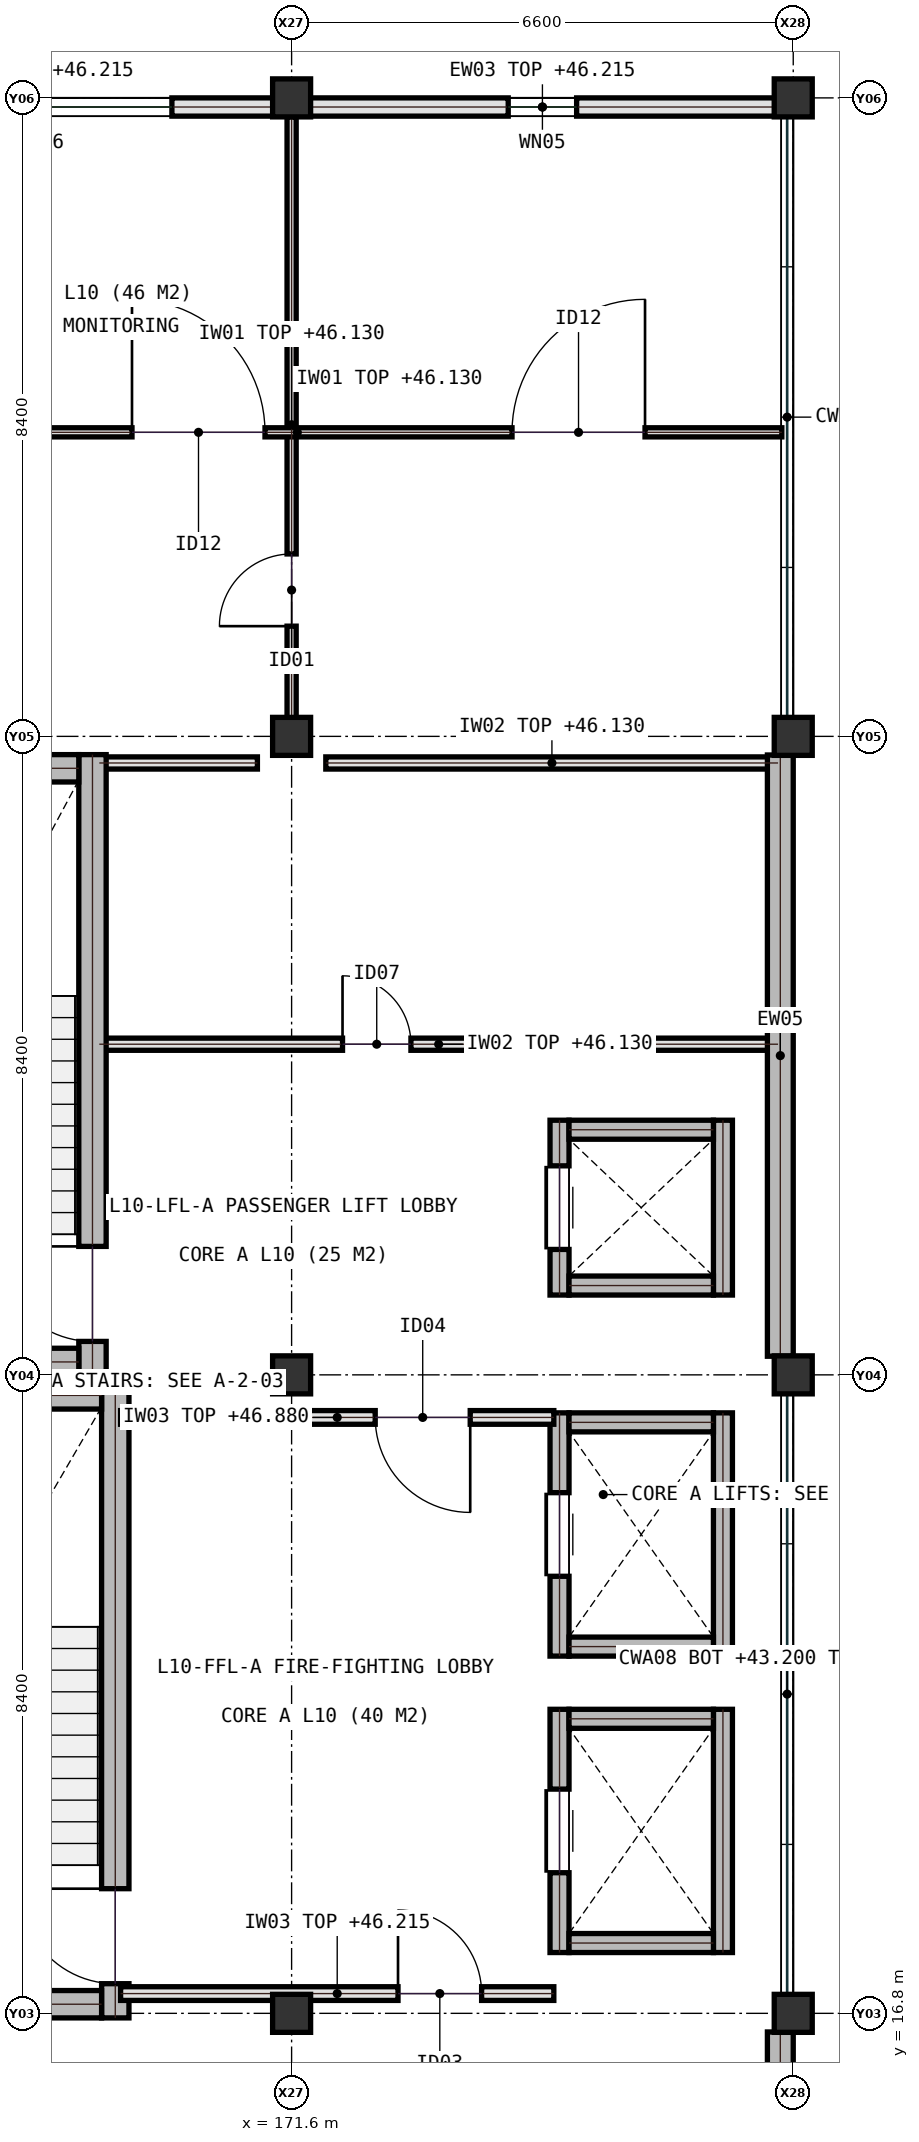
"""IFC4 building model, lengths in metres.
Left out: names, types, materials, properties, quantities, classifications, styles, units other than length and angle.
Written with IfcOpenShell. Run it as: python <this file> out.ifc"""

import sys

from ifc_helpers import new_model, si_unit, direction, frame, frame_2d, origin, origin_2d, place, context, subcontext, project, spatial, rectangle, extrude, element, fill, save


model = new_model("IFC4")
c1 = context("Model", 3, precision=1e-05, world=origin(), true_north=direction((0.0, 1.0)))
c2 = subcontext(c1, "Body", "Model", "MODEL_VIEW")
j1 = project(units=[si_unit("LENGTHUNIT", "METRE"), si_unit("PLANEANGLEUNIT", "RADIAN")], contexts=[c1])
p1 = place(None, origin())
s1 = spatial("IfcSite", under=j1, at=p1, CompositionType="ELEMENT")
p2 = place(p1, origin())
s2 = spatial("IfcBuilding", under=s1, at=p2, CompositionType="ELEMENT")
p3 = place(p2, frame((0.0, 0.0, 43.2)))
s3 = spatial("IfcBuildingStorey", under=s2, at=p3, CompositionType="ELEMENT", Elevation=43.2)
for number, where, z_axis, x_axis in (
    (1, (171.6, 16.8, 0.0), (0.0, 0.0, 1.0), (1.0, 0.0, 0.0)),
    (2, (171.6, 25.2, 0.0), (0.0, 0.0, 1.0), (1.0, 0.0, 0.0)),
    (3, (171.6, 33.6, 0.0), (0.0, 0.0, 1.0), (1.0, 0.0, 0.0)),
    (4, (171.6, 42.0, 0.0), (0.0, 0.0, 1.0), (1.0, 0.0, 0.0)),
    (5, (178.2, 16.8, 0.0), (0.0, 0.0, 1.0), (1.0, 0.0, 0.0)),
    (6, (178.2, 25.2, 0.0), (0.0, 0.0, 1.0), (1.0, 0.0, 0.0)),
    (7, (178.2, 33.6, 0.0), (0.0, 0.0, 1.0), (1.0, 0.0, 0.0)),
    (8, (178.2, 42.0, 0.0), (0.0, 0.0, 1.0), (1.0, 0.0, 0.0)),
):
    element("IfcColumn", number, at=place(p3, frame(where, z_axis=z_axis, x_axis=x_axis)), inside=s3, PredefinedType="COLUMN", context=c2, shape_type="SweptSolid", body=[
        extrude(rectangle(XDim=0.5, YDim=0.5, at=origin_2d()), origin(), (0.0, 0.0, 1.0), 3.9),
    ])
p4 = place(p3, frame((171.6, 33.65, 0.0), z_axis=(0.0, 0.0, 1.0), x_axis=(0.0, 1.0, 0.0)))
e9 = element("IfcWall", 9, at=p4, inside=s3, PredefinedType="PARTITIONING", context=c2, shape_type="SweptSolid", body=[
    extrude(rectangle(XDim=8.1, YDim=0.12, at=frame_2d((4.05, 0.0))), origin(), (0.0, 0.0, 1.0), 2.93),
])
p5 = place(p4, frame((1.4, 0.0, 0.0)))
e10 = element("IfcOpeningElement", 10, at=p5, cuts=e9, PredefinedType="OPENING", context=c2, shape_type="SweptSolid", body=[
    extrude(rectangle(XDim=0.95, YDim=2.15, at=frame_2d((0.475, 1.075))), frame((0.0, 0.07, 0.0), z_axis=(0.0, -1.0, 0.0), x_axis=(1.0, 0.0, 0.0)), (0.0, 0.0, 1.0), 0.14),
])
p6 = place(p3, frame((165.3, 37.6, 0.0), z_axis=(0.0, 0.0, 1.0), x_axis=(1.0, 0.0, 0.0)))
e11 = element("IfcWall", 11, at=p6, inside=s3, PredefinedType="PARTITIONING", context=c2, shape_type="SweptSolid", body=[
    extrude(rectangle(XDim=12.75, YDim=0.12, at=frame_2d((6.375, 0.0))), origin(), (0.0, 0.0, 1.0), 2.93),
])
p7 = place(p6, frame((4.2, 0.0, 0.0)))
e12 = element("IfcOpeningElement", 12, at=p7, cuts=e11, PredefinedType="OPENING", context=c2, shape_type="SweptSolid", body=[
    extrude(rectangle(XDim=1.75, YDim=2.3, at=frame_2d((0.875, 1.15))), frame((0.0, 0.07, 0.0), z_axis=(0.0, -1.0, 0.0), x_axis=(1.0, 0.0, 0.0)), (0.0, 0.0, 1.0), 0.14),
])
p8 = place(p6, frame((9.2, 0.0, 0.0)))
e13 = element("IfcOpeningElement", 13, at=p8, cuts=e11, PredefinedType="OPENING", context=c2, shape_type="SweptSolid", body=[
    extrude(rectangle(XDim=1.75, YDim=2.3, at=frame_2d((0.875, 1.15))), frame((0.0, 0.07, 0.0), z_axis=(0.0, -1.0, 0.0), x_axis=(1.0, 0.0, 0.0)), (0.0, 0.0, 1.0), 0.14),
])
p9 = place(p3, frame((169.07, 29.55, 0.0), z_axis=(0.0, 0.0, 1.0), x_axis=(1.0, 0.0, 0.0)))
e14 = element("IfcWall", 14, at=p9, inside=s3, PredefinedType="PARTITIONING", context=c2, shape_type="SweptSolid", body=[
    extrude(rectangle(XDim=8.93, YDim=0.16, at=frame_2d((4.465, 0.0))), origin(), (0.0, 0.0, 1.0), 2.93),
])
p10 = place(p9, frame((3.2, 0.0, 0.0)))
e15 = element("IfcOpeningElement", 15, at=p10, cuts=e14, PredefinedType="OPENING", context=c2, shape_type="SweptSolid", body=[
    extrude(rectangle(XDim=0.9, YDim=2.1, at=frame_2d((0.45, 1.05))), frame((0.0, 0.09, 0.0), z_axis=(0.0, -1.0, 0.0), x_axis=(1.0, 0.0, 0.0)), (0.0, 0.0, 1.0), 0.18),
])
p11 = place(p3, frame((169.07, 33.25, 0.0), z_axis=(0.0, 0.0, 1.0), x_axis=(1.0, 0.0, 0.0)))
e16 = element("IfcWall", 16, at=p11, inside=s3, PredefinedType="PARTITIONING", context=c2, shape_type="SweptSolid", body=[
    extrude(rectangle(XDim=2.08, YDim=0.16, at=frame_2d((1.04, 0.0))), origin(), (0.0, 0.0, 1.0), 2.93),
])
p12 = place(p3, frame((172.05, 33.25, 0.0), z_axis=(0.0, 0.0, 1.0), x_axis=(1.0, 0.0, 0.0)))
e17 = element("IfcWall", 17, at=p12, inside=s3, PredefinedType="PARTITIONING", context=c2, shape_type="SweptSolid", body=[
    extrude(rectangle(XDim=5.95, YDim=0.16, at=frame_2d((2.975, 0.0))), origin(), (0.0, 0.0, 1.0), 2.93),
])
p13 = place(p3, frame((171.355, 41.88, 0.0), z_axis=(0.0, 0.0, 1.0), x_axis=(-1.0, 0.0, 0.0)))
e18 = element("IfcWall", 18, at=p13, inside=s3, PredefinedType="SOLIDWALL", context=c2, shape_type="SweptSolid", body=[
    extrude(rectangle(XDim=6.11, YDim=0.24, at=frame_2d((3.055, 0.0))), origin(), (0.0, 0.0, 1.0), 3.015),
])
p14 = place(p13, frame((1.33, 0.0, 0.95)))
e19 = element("IfcOpeningElement", 19, at=p14, cuts=e18, PredefinedType="OPENING", context=c2, shape_type="SweptSolid", body=[
    extrude(rectangle(XDim=3.45, YDim=1.7, at=frame_2d((1.725, 0.85))), frame((0.0, 0.13, 0.0), z_axis=(0.0, -1.0, 0.0), x_axis=(1.0, 0.0, 0.0)), (0.0, 0.0, 1.0), 0.26),
])
for number, where, z_axis, x_axis in (
    (20, (178.03, 8.645, 0.0), (0.0, 0.0, 1.0), (0.0, 1.0, 0.0)),
    (21, (178.03, 25.445, 0.0), (0.0, 0.0, 1.0), (0.0, 1.0, 0.0)),
):
    element("IfcWall", number, at=place(p3, frame(where, z_axis=z_axis, x_axis=x_axis)), inside=s3, PredefinedType="SHEAR", context=c2, shape_type="SweptSolid", body=[
        extrude(rectangle(XDim=7.91, YDim=0.34, at=frame_2d((3.955, 0.0))), origin(), (0.0, 0.0, 1.0), 3.68),
    ])
p15 = place(p3, frame((177.955, 41.88, 0.0), z_axis=(0.0, 0.0, 1.0), x_axis=(-1.0, 0.0, 0.0)))
e22 = element("IfcWall", 22, at=p15, inside=s3, PredefinedType="SOLIDWALL", context=c2, shape_type="SweptSolid", body=[
    extrude(rectangle(XDim=6.11, YDim=0.24, at=frame_2d((3.055, 0.0))), origin(), (0.0, 0.0, 1.0), 3.015),
])
p16 = place(p15, frame((2.605, 0.0, 0.95)))
e23 = element("IfcOpeningElement", 23, at=p16, cuts=e22, PredefinedType="OPENING", context=c2, shape_type="SweptSolid", body=[
    extrude(rectangle(XDim=0.9, YDim=1.4, at=frame_2d((0.45, 0.7))), frame((0.0, 0.13, 0.0), z_axis=(0.0, -1.0, 0.0), x_axis=(1.0, 0.0, 0.0)), (0.0, 0.0, 1.0), 0.26),
])
p17 = place(p3, frame((169.28, 16.74, 0.0), z_axis=(0.0, 0.0, 1.0), x_axis=(0.0, 1.0, 0.0)))
e24 = element("IfcWall", 24, at=p17, inside=s3, PredefinedType="SHEAR", context=c2, shape_type="SweptSolid", body=[
    extrude(rectangle(XDim=8.37, YDim=0.36, at=frame_2d((4.185, 0.0))), origin(), (0.0, 0.0, 1.0), 3.68),
])
p18 = place(p17, frame((0.45, 0.0, 0.0)))
e25 = element("IfcOpeningElement", 25, at=p18, cuts=e24, PredefinedType="OPENING", context=c2, shape_type="SweptSolid", body=[
    extrude(rectangle(XDim=1.25, YDim=2.15, at=frame_2d((0.625, 1.075))), frame((0.0, 0.19, 0.0), z_axis=(0.0, -1.0, 0.0), x_axis=(1.0, 0.0, 0.0)), (0.0, 0.0, 1.0), 0.38),
])
for number, where, z_axis, x_axis in (
    (26, (165.6, 24.93, 0.0), (0.0, 0.0, 1.0), (1.0, 0.0, 0.0)),
    (27, (165.6, 16.92, 0.0), (0.0, 0.0, 1.0), (1.0, 0.0, 0.0)),
):
    element("IfcWall", number, at=place(p3, frame(where, z_axis=z_axis, x_axis=x_axis)), inside=s3, PredefinedType="SHEAR", context=c2, shape_type="SweptSolid", body=[
        extrude(rectangle(XDim=3.5, YDim=0.36, at=frame_2d((1.75, 0.0))), origin(), (0.0, 0.0, 1.0), 3.68),
    ])
p19 = place(p3, frame((168.98, 25.19, 0.0), z_axis=(0.0, 0.0, 1.0), x_axis=(0.0, 1.0, 0.0)))
e28 = element("IfcWall", 28, at=p19, inside=s3, PredefinedType="SHEAR", context=c2, shape_type="SweptSolid", body=[
    extrude(rectangle(XDim=8.17, YDim=0.36, at=frame_2d((4.085, 0.0))), origin(), (0.0, 0.0, 1.0), 3.68),
])
p20 = place(p19, frame((0.45, 0.0, 0.0)))
e29 = element("IfcOpeningElement", 29, at=p20, cuts=e28, PredefinedType="OPENING", context=c2, shape_type="SweptSolid", body=[
    extrude(rectangle(XDim=1.25, YDim=2.15, at=frame_2d((0.625, 1.075))), frame((0.0, 0.19, 0.0), z_axis=(0.0, -1.0, 0.0), x_axis=(1.0, 0.0, 0.0)), (0.0, 0.0, 1.0), 0.38),
])
for number, where, z_axis, x_axis in (
    (30, (165.6, 33.18, 0.0), (0.0, 0.0, 1.0), (1.0, 0.0, 0.0)),
    (31, (165.6, 25.37, 0.0), (0.0, 0.0, 1.0), (1.0, 0.0, 0.0)),
):
    element("IfcWall", number, at=place(p3, frame(where, z_axis=z_axis, x_axis=x_axis)), inside=s3, PredefinedType="SHEAR", context=c2, shape_type="SweptSolid", body=[
        extrude(rectangle(XDim=3.2, YDim=0.36, at=frame_2d((1.6, 0.0))), origin(), (0.0, 0.0, 1.0), 3.68),
    ])
p21 = place(p3, frame((175.125, 17.6, 0.0), z_axis=(0.0, 0.0, 1.0), x_axis=(0.0, 1.0, 0.0)))
e32 = element("IfcWall", 32, at=p21, inside=s3, PredefinedType="SHEAR", context=c2, shape_type="SweptSolid", body=[
    extrude(rectangle(XDim=3.2, YDim=0.25, at=frame_2d((1.6, 0.0))), origin(), (0.0, 0.0, 1.0), 3.68),
])
p22 = place(p21, frame((1.05, 0.0, 0.0)))
e33 = element("IfcOpeningElement", 33, at=p22, cuts=e32, PredefinedType="OPENING", context=c2, shape_type="SweptSolid", body=[
    extrude(rectangle(XDim=1.1, YDim=2.15, at=frame_2d((0.55, 1.075))), frame((0.0, 0.135, 0.0), z_axis=(0.0, -1.0, 0.0), x_axis=(1.0, 0.0, 0.0)), (0.0, 0.0, 1.0), 0.27),
])
p23 = place(p3, frame((177.275, 17.6, 0.0), z_axis=(0.0, 0.0, 1.0), x_axis=(0.0, 1.0, 0.0)))
e34 = element("IfcWall", 34, at=p23, inside=s3, PredefinedType="SHEAR", context=c2, shape_type="SweptSolid", body=[
    extrude(rectangle(XDim=3.2, YDim=0.25, at=frame_2d((1.6, 0.0))), origin(), (0.0, 0.0, 1.0), 3.68),
])
for number, where, z_axis, x_axis in (
    (35, (175.25, 17.725, 0.0), (0.0, 0.0, 1.0), (1.0, 0.0, 0.0)),
    (36, (175.25, 20.675, 0.0), (0.0, 0.0, 1.0), (1.0, 0.0, 0.0)),
):
    element("IfcWall", number, at=place(p3, frame(where, z_axis=z_axis, x_axis=x_axis)), inside=s3, PredefinedType="SHEAR", context=c2, shape_type="SweptSolid", body=[
        extrude(rectangle(XDim=1.9, YDim=0.25, at=frame_2d((0.95, 0.0))), origin(), (0.0, 0.0, 1.0), 3.68),
    ])
p24 = place(p3, frame((175.125, 21.5, 0.0), z_axis=(0.0, 0.0, 1.0), x_axis=(0.0, 1.0, 0.0)))
e37 = element("IfcWall", 37, at=p24, inside=s3, PredefinedType="SHEAR", context=c2, shape_type="SweptSolid", body=[
    extrude(rectangle(XDim=3.2, YDim=0.25, at=frame_2d((1.6, 0.0))), origin(), (0.0, 0.0, 1.0), 3.68),
])
p25 = place(p24, frame((1.05, 0.0, 0.0)))
e38 = element("IfcOpeningElement", 38, at=p25, cuts=e37, PredefinedType="OPENING", context=c2, shape_type="SweptSolid", body=[
    extrude(rectangle(XDim=1.1, YDim=2.15, at=frame_2d((0.55, 1.075))), frame((0.0, 0.135, 0.0), z_axis=(0.0, -1.0, 0.0), x_axis=(1.0, 0.0, 0.0)), (0.0, 0.0, 1.0), 0.27),
])
p26 = place(p3, frame((177.275, 21.5, 0.0), z_axis=(0.0, 0.0, 1.0), x_axis=(0.0, 1.0, 0.0)))
e39 = element("IfcWall", 39, at=p26, inside=s3, PredefinedType="SHEAR", context=c2, shape_type="SweptSolid", body=[
    extrude(rectangle(XDim=3.2, YDim=0.25, at=frame_2d((1.6, 0.0))), origin(), (0.0, 0.0, 1.0), 3.68),
])
for number, where, z_axis, x_axis in (
    (40, (175.25, 21.625, 0.0), (0.0, 0.0, 1.0), (1.0, 0.0, 0.0)),
    (41, (175.25, 24.575, 0.0), (0.0, 0.0, 1.0), (1.0, 0.0, 0.0)),
):
    element("IfcWall", number, at=place(p3, frame(where, z_axis=z_axis, x_axis=x_axis)), inside=s3, PredefinedType="SHEAR", context=c2, shape_type="SweptSolid", body=[
        extrude(rectangle(XDim=1.9, YDim=0.25, at=frame_2d((0.95, 0.0))), origin(), (0.0, 0.0, 1.0), 3.68),
    ])
p27 = place(p3, frame((175.125, 26.25, 0.0), z_axis=(0.0, 0.0, 1.0), x_axis=(0.0, 1.0, 0.0)))
e42 = element("IfcWall", 42, at=p27, inside=s3, PredefinedType="SHEAR", context=c2, shape_type="SweptSolid", body=[
    extrude(rectangle(XDim=2.3, YDim=0.25, at=frame_2d((1.15, 0.0))), origin(), (0.0, 0.0, 1.0), 3.68),
])
p28 = place(p27, frame((0.6, 0.0, 0.0)))
e43 = element("IfcOpeningElement", 43, at=p28, cuts=e42, PredefinedType="OPENING", context=c2, shape_type="SweptSolid", body=[
    extrude(rectangle(XDim=1.1, YDim=2.15, at=frame_2d((0.55, 1.075))), frame((0.0, 0.135, 0.0), z_axis=(0.0, -1.0, 0.0), x_axis=(1.0, 0.0, 0.0)), (0.0, 0.0, 1.0), 0.27),
])
p29 = place(p3, frame((177.275, 26.25, 0.0), z_axis=(0.0, 0.0, 1.0), x_axis=(0.0, 1.0, 0.0)))
e44 = element("IfcWall", 44, at=p29, inside=s3, PredefinedType="SHEAR", context=c2, shape_type="SweptSolid", body=[
    extrude(rectangle(XDim=2.3, YDim=0.25, at=frame_2d((1.15, 0.0))), origin(), (0.0, 0.0, 1.0), 3.68),
])
for number, where, z_axis, x_axis in (
    (45, (175.25, 26.375, 0.0), (0.0, 0.0, 1.0), (1.0, 0.0, 0.0)),
    (46, (175.25, 28.425, 0.0), (0.0, 0.0, 1.0), (1.0, 0.0, 0.0)),
):
    element("IfcWall", number, at=place(p3, frame(where, z_axis=z_axis, x_axis=x_axis)), inside=s3, PredefinedType="SHEAR", context=c2, shape_type="SweptSolid", body=[
        extrude(rectangle(XDim=1.9, YDim=0.25, at=frame_2d((0.95, 0.0))), origin(), (0.0, 0.0, 1.0), 3.68),
    ])
p30 = place(p3, frame((169.35, 24.64, 0.0), z_axis=(0.0, 0.0, 1.0), x_axis=(1.0, 0.0, 0.0)))
e47 = element("IfcWall", 47, at=p30, inside=s3, PredefinedType="SOLIDWALL", context=c2, shape_type="SweptSolid", body=[
    extrude(rectangle(XDim=5.7, YDim=0.18, at=frame_2d((2.85, 0.0))), origin(), (0.0, 0.0, 1.0), 3.68),
])
p31 = place(p30, frame((3.35, 0.0, 0.0)))
e48 = element("IfcOpeningElement", 48, at=p31, cuts=e47, PredefinedType="OPENING", context=c2, shape_type="SweptSolid", body=[
    extrude(rectangle(XDim=1.25, YDim=2.15, at=frame_2d((0.625, 1.075))), frame((0.0, 0.1, 0.0), z_axis=(0.0, -1.0, 0.0), x_axis=(1.0, 0.0, 0.0)), (0.0, 0.0, 1.0), 0.2),
])
p32 = place(p3, frame((169.35, 17.06, 0.0), z_axis=(0.0, 0.0, 1.0), x_axis=(1.0, 0.0, 0.0)))
e49 = element("IfcWall", 49, at=p32, inside=s3, PredefinedType="SOLIDWALL", context=c2, shape_type="SweptSolid", body=[
    extrude(rectangle(XDim=5.7, YDim=0.18, at=frame_2d((2.85, 0.0))), origin(), (0.0, 0.0, 1.0), 3.015),
])
p33 = place(p32, frame((3.65, 0.0, 0.0)))
e50 = element("IfcOpeningElement", 50, at=p33, cuts=e49, PredefinedType="OPENING", context=c2, shape_type="SweptSolid", body=[
    extrude(rectangle(XDim=1.1, YDim=2.15, at=frame_2d((0.55, 1.075))), frame((0.0, 0.1, 0.0), z_axis=(0.0, -1.0, 0.0), x_axis=(1.0, 0.0, 0.0)), (0.0, 0.0, 1.0), 0.2),
])
p34 = place(p5, origin())
e51 = element("IfcDoor", 51, at=p34, inside=s3, OperationType="SINGLE_SWING_LEFT", PredefinedType="DOOR", context=c2, shape_type="SweptSolid", body=[
    extrude(rectangle(XDim=0.95, YDim=2.15, at=frame_2d((0.475, 1.075))), frame((0.0, 0.025, 0.0), z_axis=(0.0, -1.0, 0.0), x_axis=(1.0, 0.0, 0.0)), (0.0, 0.0, 1.0), 0.05),
])
fill(e10, e51)
p35 = place(p7, origin())
e52 = element("IfcDoor", 52, at=p35, inside=s3, OperationType="SINGLE_SWING_LEFT", PredefinedType="DOOR", context=c2, shape_type="SweptSolid", body=[
    extrude(rectangle(XDim=1.75, YDim=2.3, at=frame_2d((0.875, 1.15))), frame((0.0, 0.025, 0.0), z_axis=(0.0, -1.0, 0.0), x_axis=(1.0, 0.0, 0.0)), (0.0, 0.0, 1.0), 0.05),
])
fill(e12, e52)
p36 = place(p8, origin())
e53 = element("IfcDoor", 53, at=p36, inside=s3, OperationType="SINGLE_SWING_RIGHT", PredefinedType="DOOR", context=c2, shape_type="SweptSolid", body=[
    extrude(rectangle(XDim=1.75, YDim=2.3, at=frame_2d((0.875, 1.15))), frame((0.0, 0.025, 0.0), z_axis=(0.0, -1.0, 0.0), x_axis=(1.0, 0.0, 0.0)), (0.0, 0.0, 1.0), 0.05),
])
fill(e13, e53)
p37 = place(p10, origin())
e54 = element("IfcDoor", 54, at=p37, inside=s3, OperationType="SINGLE_SWING_LEFT", PredefinedType="DOOR", context=c2, shape_type="SweptSolid", body=[
    extrude(rectangle(XDim=0.9, YDim=2.1, at=frame_2d((0.45, 1.05))), frame((0.0, 0.025, 0.0), z_axis=(0.0, -1.0, 0.0), x_axis=(1.0, 0.0, 0.0)), (0.0, 0.0, 1.0), 0.05),
])
fill(e15, e54)
p38 = place(p14, origin())
e55 = element("IfcWindow", 55, at=p38, inside=s3, PartitioningType="SINGLE_PANEL", PredefinedType="WINDOW", context=c2, shape_type="SweptSolid", body=[
    extrude(rectangle(XDim=3.45, YDim=1.7, at=frame_2d((1.725, 0.85))), frame((0.0, 0.03, 0.0), z_axis=(0.0, -1.0, 0.0), x_axis=(1.0, 0.0, 0.0)), (0.0, 0.0, 1.0), 0.06),
])
fill(e19, e55)
p39 = place(p16, origin())
e56 = element("IfcWindow", 56, at=p39, inside=s3, PartitioningType="SINGLE_PANEL", PredefinedType="WINDOW", context=c2, shape_type="SweptSolid", body=[
    extrude(rectangle(XDim=0.9, YDim=1.4, at=frame_2d((0.45, 0.7))), frame((0.0, 0.03, 0.0), z_axis=(0.0, -1.0, 0.0), x_axis=(1.0, 0.0, 0.0)), (0.0, 0.0, 1.0), 0.06),
])
fill(e23, e56)
p40 = place(p18, origin())
e57 = element("IfcDoor", 57, at=p40, inside=s3, OperationType="SINGLE_SWING_RIGHT", PredefinedType="DOOR", context=c2, shape_type="SweptSolid", body=[
    extrude(rectangle(XDim=1.25, YDim=2.15, at=frame_2d((0.625, 1.075))), frame((0.0, 0.025, 0.0), z_axis=(0.0, -1.0, 0.0), x_axis=(1.0, 0.0, 0.0)), (0.0, 0.0, 1.0), 0.05),
])
fill(e25, e57)
p41 = place(p20, origin())
e58 = element("IfcDoor", 58, at=p41, inside=s3, OperationType="SINGLE_SWING_RIGHT", PredefinedType="DOOR", context=c2, shape_type="SweptSolid", body=[
    extrude(rectangle(XDim=1.25, YDim=2.15, at=frame_2d((0.625, 1.075))), frame((0.0, 0.025, 0.0), z_axis=(0.0, -1.0, 0.0), x_axis=(1.0, 0.0, 0.0)), (0.0, 0.0, 1.0), 0.05),
])
fill(e29, e58)
p42 = place(p22, origin())
e59 = element("IfcDoor", 59, at=p42, inside=s3, OperationType="SLIDING_TO_LEFT", PredefinedType="DOOR", context=c2, shape_type="SweptSolid", body=[
    extrude(rectangle(XDim=1.1, YDim=2.15, at=frame_2d((0.55, 1.075))), frame((0.0, 0.025, 0.0), z_axis=(0.0, -1.0, 0.0), x_axis=(1.0, 0.0, 0.0)), (0.0, 0.0, 1.0), 0.05),
])
fill(e33, e59)
p43 = place(p25, origin())
e60 = element("IfcDoor", 60, at=p43, inside=s3, OperationType="SLIDING_TO_LEFT", PredefinedType="DOOR", context=c2, shape_type="SweptSolid", body=[
    extrude(rectangle(XDim=1.1, YDim=2.15, at=frame_2d((0.55, 1.075))), frame((0.0, 0.025, 0.0), z_axis=(0.0, -1.0, 0.0), x_axis=(1.0, 0.0, 0.0)), (0.0, 0.0, 1.0), 0.05),
])
fill(e38, e60)
p44 = place(p28, origin())
e61 = element("IfcDoor", 61, at=p44, inside=s3, OperationType="SLIDING_TO_LEFT", PredefinedType="DOOR", context=c2, shape_type="SweptSolid", body=[
    extrude(rectangle(XDim=1.1, YDim=2.15, at=frame_2d((0.55, 1.075))), frame((0.0, 0.025, 0.0), z_axis=(0.0, -1.0, 0.0), x_axis=(1.0, 0.0, 0.0)), (0.0, 0.0, 1.0), 0.05),
])
fill(e43, e61)
p45 = place(p31, frame((1.25, 0.0, 0.0), z_axis=(0.0, 0.0, 1.0), x_axis=(-1.0, 0.0, 0.0)))
e62 = element("IfcDoor", 62, at=p45, inside=s3, OperationType="SINGLE_SWING_RIGHT", PredefinedType="DOOR", context=c2, shape_type="SweptSolid", body=[
    extrude(rectangle(XDim=1.25, YDim=2.15, at=frame_2d((0.625, 1.075))), frame((0.0, 0.025, 0.0), z_axis=(0.0, -1.0, 0.0), x_axis=(1.0, 0.0, 0.0)), (0.0, 0.0, 1.0), 0.05),
])
fill(e48, e62)
p46 = place(p33, origin())
e63 = element("IfcDoor", 63, at=p46, inside=s3, OperationType="SINGLE_SWING_LEFT", PredefinedType="DOOR", context=c2, shape_type="SweptSolid", body=[
    extrude(rectangle(XDim=1.1, YDim=2.15, at=frame_2d((0.55, 1.075))), frame((0.0, 0.025, 0.0), z_axis=(0.0, -1.0, 0.0), x_axis=(1.0, 0.0, 0.0)), (0.0, 0.0, 1.0), 0.05),
])
fill(e50, e63)
save(model, sys.argv[1])
